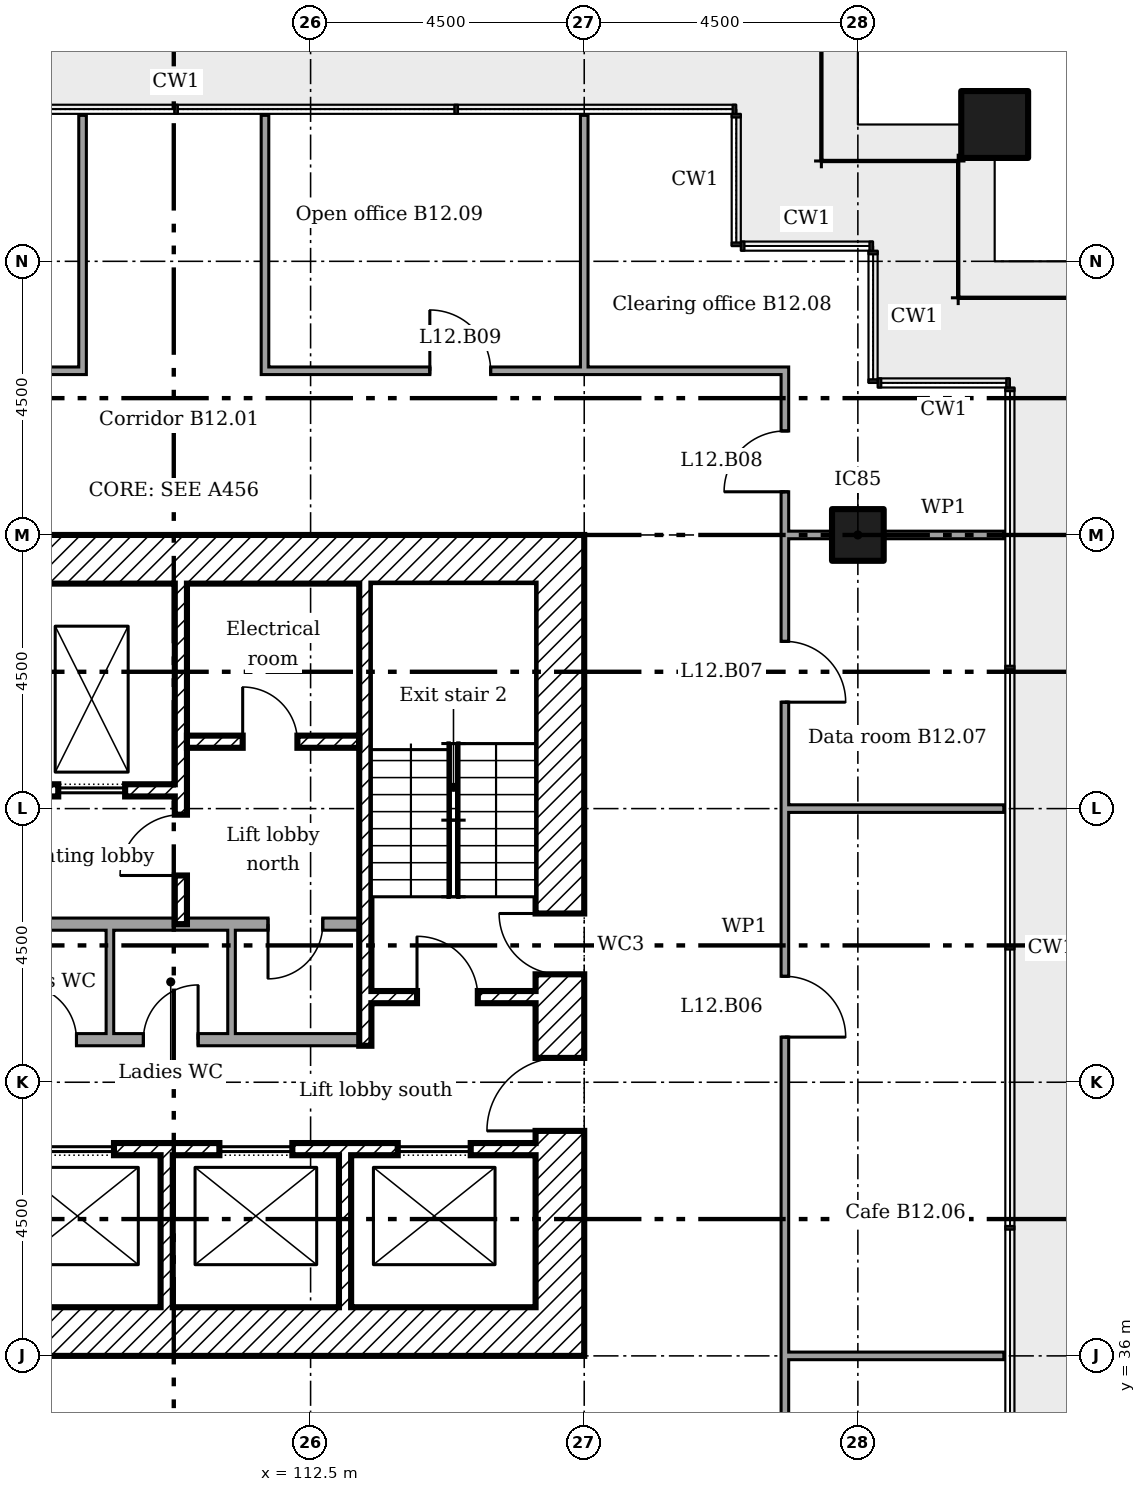
"""IFC4 building model, lengths in metres.
Left out: names, types, materials, properties, quantities, classifications, styles, units other than length and angle.
Written with IfcOpenShell. Run it as: python <this file> out.ifc"""

import sys

from ifc_helpers import new_model, si_unit, direction, frame, frame_2d, origin, origin_2d, place, context, subcontext, project, spatial, rectangle, extrude, element, fill, save


model = new_model("IFC4")
c1 = context("Model", 3, precision=1e-05, world=origin(), true_north=direction((0.0, 1.0)))
c2 = subcontext(c1, "Body", "Model", "MODEL_VIEW")
j1 = project(units=[si_unit("LENGTHUNIT", "METRE"), si_unit("PLANEANGLEUNIT", "RADIAN")], contexts=[c1])
p1 = place(None, origin())
s1 = spatial("IfcSite", under=j1, at=p1, CompositionType="ELEMENT")
p2 = place(p1, origin())
s2 = spatial("IfcBuilding", under=s1, at=p2, CompositionType="ELEMENT")
p3 = place(p2, frame((0.0, 0.0, 54.6)))
s3 = spatial("IfcBuildingStorey", under=s2, at=p3, CompositionType="ELEMENT", Elevation=54.6)
p4 = place(p3, frame((123.75, 56.25, 0.0)))
e1 = element("IfcColumn", 1, at=p4, inside=s3, PredefinedType="COLUMN", context=c2, shape_type="SweptSolid", body=[
    extrude(rectangle(XDim=1.1, YDim=1.1, at=origin_2d()), origin(), (0.0, 0.0, 1.0), 3.6),
])
p5 = place(p3, frame((121.5, 49.5, 0.0)))
e2 = element("IfcColumn", 2, at=p5, inside=s3, PredefinedType="COLUMN", context=c2, shape_type="SweptSolid", body=[
    extrude(rectangle(XDim=0.85, YDim=0.85, at=origin_2d()), origin(), (0.0, 0.0, 1.0), 3.6),
])
p6 = place(p3, frame((116.6, 36.0, 0.0), z_axis=(0.0, 0.0, 1.0), x_axis=(0.0, 1.0, 0.0)))
e3 = element("IfcWall", 3, at=p6, inside=s3, PredefinedType="SHEAR", context=c2, shape_type="SweptSolid", body=[
    extrude(rectangle(XDim=13.5, YDim=0.8, at=frame_2d((6.75, 0.0))), origin(), (0.0, 0.0, 1.0), 3.35),
])
p7 = place(p6, frame((3.7, 0.0, 0.0)))
e4 = element("IfcOpeningElement", 4, at=p7, cuts=e3, PredefinedType="OPENING", context=c2, shape_type="SweptSolid", body=[
    extrude(rectangle(XDim=1.2, YDim=2.1, at=frame_2d((0.6, 1.05))), frame((0.0, 0.41, 0.0), z_axis=(0.0, -1.0, 0.0), x_axis=(1.0, 0.0, 0.0)), (0.0, 0.0, 1.0), 0.82),
])
p8 = place(p6, frame((6.275, 0.0, 0.0)))
e5 = element("IfcOpeningElement", 5, at=p8, cuts=e3, PredefinedType="OPENING", context=c2, shape_type="SweptSolid", body=[
    extrude(rectangle(XDim=1.0, YDim=2.1, at=frame_2d((0.5, 1.05))), frame((0.0, 0.41, 0.0), z_axis=(0.0, -1.0, 0.0), x_axis=(1.0, 0.0, 0.0)), (0.0, 0.0, 1.0), 0.82),
])
for number, where in (
    (6, (104.3, 49.1, 0.0)),
    (7, (104.3, 36.4, 0.0)),
):
    element("IfcWall", number, at=place(p3, frame(where)), inside=s3, PredefinedType="SHEAR", context=c2, shape_type="SweptSolid", body=[
        extrude(rectangle(XDim=11.9, YDim=0.8, at=frame_2d((5.95, 0.0))), origin(), (0.0, 0.0, 1.0), 3.35),
    ])
p9 = place(p3, frame((110.367, 48.7, 0.0), z_axis=(0.0, 0.0, 1.0), x_axis=(0.0, -1.0, 0.0)))
e8 = element("IfcWall", 8, at=p9, inside=s3, PredefinedType="SHEAR", context=c2, shape_type="SweptSolid", body=[
    extrude(rectangle(XDim=5.6, YDim=0.2, at=frame_2d((2.8, 0.0))), origin(), (0.0, 0.0, 1.0), 3.35),
])
p10 = place(p9, frame((3.8, 0.0, 0.0)))
e9 = element("IfcOpeningElement", 9, at=p10, cuts=e8, PredefinedType="OPENING", context=c2, shape_type="SweptSolid", body=[
    extrude(rectangle(XDim=1.0, YDim=2.1, at=frame_2d((0.5, 1.05))), frame((0.0, 0.11, 0.0), z_axis=(0.0, -1.0, 0.0), x_axis=(1.0, 0.0, 0.0)), (0.0, 0.0, 1.0), 0.22),
])
for number, where, z_axis, x_axis in (
    (10, (110.133, 36.8, 0.0), (0.0, 0.0, 1.0), (0.0, 1.0, 0.0)),
    (11, (113.067, 36.8, 0.0), (0.0, 0.0, 1.0), (0.0, 1.0, 0.0)),
):
    element("IfcWall", number, at=place(p3, frame(where, z_axis=z_axis, x_axis=x_axis)), inside=s3, PredefinedType="SHEAR", context=c2, shape_type="SweptSolid", body=[
        extrude(rectangle(XDim=2.5, YDim=0.2, at=frame_2d((1.25, 0.0))), origin(), (0.0, 0.0, 1.0), 3.35),
    ])
p11 = place(p3, frame((110.467, 46.1, 0.0)))
e12 = element("IfcWall", 12, at=p11, inside=s3, PredefinedType="SHEAR", context=c2, shape_type="SweptSolid", body=[
    extrude(rectangle(XDim=2.833, YDim=0.2, at=frame_2d((1.417, 0.0))), origin(), (0.0, 0.0, 1.0), 3.35),
])
p12 = place(p11, frame((0.917, 0.0, 0.0)))
e13 = element("IfcOpeningElement", 13, at=p12, cuts=e12, PredefinedType="OPENING", context=c2, shape_type="SweptSolid", body=[
    extrude(rectangle(XDim=0.9, YDim=2.1, at=frame_2d((0.45, 1.05))), frame((0.0, 0.11, 0.0), z_axis=(0.0, -1.0, 0.0), x_axis=(1.0, 0.0, 0.0)), (0.0, 0.0, 1.0), 0.22),
])
p13 = place(p3, frame((107.533, 45.3, 0.0)))
e14 = element("IfcWall", 14, at=p13, inside=s3, PredefinedType="SHEAR", context=c2, shape_type="SweptSolid", body=[
    extrude(rectangle(XDim=2.733, YDim=0.2, at=frame_2d((1.367, 0.0))), origin(), (0.0, 0.0, 1.0), 3.35),
])
p14 = place(p13, frame((0.817, 0.0, 0.0)))
e15 = element("IfcOpeningElement", 15, at=p14, cuts=e14, PredefinedType="OPENING", context=c2, shape_type="SweptSolid", body=[
    extrude(rectangle(XDim=1.1, YDim=2.1, at=frame_2d((0.55, 1.05))), frame((0.0, 0.11, 0.0), z_axis=(0.0, -1.0, 0.0), x_axis=(1.0, 0.0, 0.0)), (0.0, 0.0, 1.0), 0.22),
])
p15 = place(p3, frame((107.2, 39.4, 0.0)))
e16 = element("IfcWall", 16, at=p15, inside=s3, PredefinedType="SHEAR", context=c2, shape_type="SweptSolid", body=[
    extrude(rectangle(XDim=9.0, YDim=0.2, at=frame_2d((4.5, 0.0))), origin(), (0.0, 0.0, 1.0), 3.35),
])
p16 = place(p15, frame((0.867, 0.0, 0.0)))
e17 = element("IfcOpeningElement", 17, at=p16, cuts=e16, PredefinedType="OPENING", context=c2, shape_type="SweptSolid", body=[
    extrude(rectangle(XDim=1.2, YDim=2.1, at=frame_2d((0.6, 1.05))), frame((0.0, 0.11, 0.0), z_axis=(0.0, -1.0, 0.0), x_axis=(1.0, 0.0, 0.0)), (0.0, 0.0, 1.0), 0.22),
])
p17 = place(p15, frame((3.8, 0.0, 0.0)))
e18 = element("IfcOpeningElement", 18, at=p17, cuts=e16, PredefinedType="OPENING", context=c2, shape_type="SweptSolid", body=[
    extrude(rectangle(XDim=1.2, YDim=2.1, at=frame_2d((0.6, 1.05))), frame((0.0, 0.11, 0.0), z_axis=(0.0, -1.0, 0.0), x_axis=(1.0, 0.0, 0.0)), (0.0, 0.0, 1.0), 0.22),
])
p18 = place(p15, frame((6.733, 0.0, 0.0)))
e19 = element("IfcOpeningElement", 19, at=p18, cuts=e16, PredefinedType="OPENING", context=c2, shape_type="SweptSolid", body=[
    extrude(rectangle(XDim=1.2, YDim=2.1, at=frame_2d((0.6, 1.05))), frame((0.0, 0.11, 0.0), z_axis=(0.0, -1.0, 0.0), x_axis=(1.0, 0.0, 0.0)), (0.0, 0.0, 1.0), 0.22),
])
p19 = place(p3, frame((113.5, 41.9, 0.0)))
e20 = element("IfcWall", 20, at=p19, inside=s3, PredefinedType="SHEAR", context=c2, shape_type="SweptSolid", body=[
    extrude(rectangle(XDim=2.7, YDim=0.2, at=frame_2d((1.35, 0.0))), origin(), (0.0, 0.0, 1.0), 3.35),
])
p20 = place(p19, frame((0.75, 0.0, 0.0)))
e21 = element("IfcOpeningElement", 21, at=p20, cuts=e20, PredefinedType="OPENING", context=c2, shape_type="SweptSolid", body=[
    extrude(rectangle(XDim=1.0, YDim=2.1, at=frame_2d((0.5, 1.05))), frame((0.0, 0.11, 0.0), z_axis=(0.0, -1.0, 0.0), x_axis=(1.0, 0.0, 0.0)), (0.0, 0.0, 1.0), 0.22),
])
p21 = place(p3, frame((113.4, 41.1, 0.0), z_axis=(0.0, 0.0, 1.0), x_axis=(0.0, 1.0, 0.0)))
e22 = element("IfcWall", 22, at=p21, inside=s3, PredefinedType="SHEAR", context=c2, shape_type="SweptSolid", body=[
    extrude(rectangle(XDim=7.6, YDim=0.2, at=frame_2d((3.8, 0.0))), origin(), (0.0, 0.0, 1.0), 3.35),
])
p22 = place(p3, frame((107.2, 43.1, 0.0)))
e23 = element("IfcWall", 23, at=p22, inside=s3, PredefinedType="PARTITIONING", context=c2, shape_type="SweptSolid", body=[
    extrude(rectangle(XDim=6.1, YDim=0.2, at=frame_2d((3.05, 0.0))), origin(), (0.0, 0.0, 1.0), 3.35),
])
p23 = place(p22, frame((4.6, 0.0, 0.0)))
e24 = element("IfcOpeningElement", 24, at=p23, cuts=e23, PredefinedType="OPENING", context=c2, shape_type="SweptSolid", body=[
    extrude(rectangle(XDim=0.9, YDim=2.1, at=frame_2d((0.45, 1.05))), frame((0.0, 0.11, 0.0), z_axis=(0.0, -1.0, 0.0), x_axis=(1.0, 0.0, 0.0)), (0.0, 0.0, 1.0), 0.22),
])
p24 = place(p3, frame((107.2, 41.2, 0.0)))
e25 = element("IfcWall", 25, at=p24, inside=s3, PredefinedType="PARTITIONING", context=c2, shape_type="SweptSolid", body=[
    extrude(rectangle(XDim=6.1, YDim=0.2, at=frame_2d((3.05, 0.0))), origin(), (0.0, 0.0, 1.0), 3.35),
])
p25 = place(p24, frame((0.55, 0.0, 0.0)))
e26 = element("IfcOpeningElement", 26, at=p25, cuts=e25, PredefinedType="OPENING", context=c2, shape_type="SweptSolid", body=[
    extrude(rectangle(XDim=0.9, YDim=2.1, at=frame_2d((0.45, 1.05))), frame((0.0, 0.11, 0.0), z_axis=(0.0, -1.0, 0.0), x_axis=(1.0, 0.0, 0.0)), (0.0, 0.0, 1.0), 0.22),
])
p26 = place(p24, frame((2.55, 0.0, 0.0)))
e27 = element("IfcOpeningElement", 27, at=p26, cuts=e25, PredefinedType="OPENING", context=c2, shape_type="SweptSolid", body=[
    extrude(rectangle(XDim=0.9, YDim=2.1, at=frame_2d((0.45, 1.05))), frame((0.0, 0.11, 0.0), z_axis=(0.0, -1.0, 0.0), x_axis=(1.0, 0.0, 0.0)), (0.0, 0.0, 1.0), 0.22),
])
for number, where, z_axis, x_axis in (
    (28, (109.2, 41.3, 0.0), (0.0, 0.0, 1.0), (0.0, 1.0, 0.0)),
    (29, (111.2, 41.3, 0.0), (0.0, 0.0, 1.0), (0.0, 1.0, 0.0)),
):
    element("IfcWall", number, at=place(p3, frame(where, z_axis=z_axis, x_axis=x_axis)), inside=s3, PredefinedType="PARTITIONING", context=c2, shape_type="SweptSolid", body=[
        extrude(rectangle(XDim=1.7, YDim=0.125, at=frame_2d((0.85, 0.0))), origin(), (0.0, 0.0, 1.0), 3.35),
    ])
for number, where in (
    (30, (120.3, 36.0, 0.0)),
    (31, (120.3, 45.0, 0.0)),
):
    element("IfcWall", number, at=place(p3, frame(where)), inside=s3, PredefinedType="PARTITIONING", context=c2, shape_type="SweptSolid", body=[
        extrude(rectangle(XDim=3.6, YDim=0.125, at=frame_2d((1.8, 0.0))), origin(), (0.0, 0.0, 1.0), 2.851),
    ])
p27 = place(p3, frame((120.3, 49.5, 0.0)))
e32 = element("IfcWall", 32, at=p27, inside=s3, PredefinedType="PARTITIONING", context=c2, shape_type="SweptSolid", body=[
    extrude(rectangle(XDim=0.775, YDim=0.125, at=frame_2d((0.387, 0.0))), origin(), (0.0, 0.0, 1.0), 2.842),
])
p28 = place(p3, frame((121.925, 49.5, 0.0)))
e33 = element("IfcWall", 33, at=p28, inside=s3, PredefinedType="PARTITIONING", context=c2, shape_type="SweptSolid", body=[
    extrude(rectangle(XDim=1.975, YDim=0.125, at=frame_2d((0.987, 0.0))), origin(), (0.0, 0.0, 1.0), 2.842),
])
p29 = place(p3, frame((100.738, 52.2, 0.0)))
e34 = element("IfcWall", 34, at=p29, inside=s3, PredefinedType="PARTITIONING", context=c2, shape_type="SweptSolid", body=[
    extrude(rectangle(XDim=8.075, YDim=0.125, at=frame_2d((4.038, 0.0))), origin(), (0.0, 0.0, 1.0), 3.45),
])
p30 = place(p29, frame((4.887, 0.0, 0.0)))
e35 = element("IfcOpeningElement", 35, at=p30, cuts=e34, PredefinedType="OPENING", context=c2, shape_type="SweptSolid", body=[
    extrude(rectangle(XDim=1.0, YDim=2.1, at=frame_2d((0.5, 1.05))), frame((0.0, 0.073, 0.0), z_axis=(0.0, -1.0, 0.0), x_axis=(1.0, 0.0, 0.0)), (0.0, 0.0, 1.0), 0.145),
])
p31 = place(p3, frame((111.688, 52.2, 0.0)))
e36 = element("IfcWall", 36, at=p31, inside=s3, PredefinedType="PARTITIONING", context=c2, shape_type="SweptSolid", body=[
    extrude(rectangle(XDim=8.675, YDim=0.125, at=frame_2d((4.337, 0.0))), origin(), (0.0, 0.0, 1.0), 3.45),
])
p32 = place(p31, frame((2.773, 0.0, 0.0)))
e37 = element("IfcOpeningElement", 37, at=p32, cuts=e36, PredefinedType="OPENING", context=c2, shape_type="SweptSolid", body=[
    extrude(rectangle(XDim=1.0, YDim=2.1, at=frame_2d((0.5, 1.05))), frame((0.0, 0.073, 0.0), z_axis=(0.0, -1.0, 0.0), x_axis=(1.0, 0.0, 0.0)), (0.0, 0.0, 1.0), 0.145),
])
for number, where, z_axis, x_axis in (
    (38, (108.75, 52.262, 0.0), (0.0, 0.0, 1.0), (0.0, 1.0, 0.0)),
    (39, (111.75, 52.262, 0.0), (0.0, 0.0, 1.0), (0.0, 1.0, 0.0)),
):
    element("IfcWall", number, at=place(p3, frame(where, z_axis=z_axis, x_axis=x_axis)), inside=s3, PredefinedType="PARTITIONING", context=c2, shape_type="SweptSolid", body=[
        extrude(rectangle(XDim=4.137, YDim=0.125, at=frame_2d((2.069, 0.0))), origin(), (0.0, 0.0, 1.0), 3.45),
    ])
p33 = place(p3, frame((117.0, 52.2, 0.0), z_axis=(0.0, 0.0, 1.0), x_axis=(0.0, 1.0, 0.0)))
e40 = element("IfcWall", 40, at=p33, inside=s3, PredefinedType="PARTITIONING", context=c2, shape_type="SweptSolid", body=[
    extrude(rectangle(XDim=4.2, YDim=0.125, at=frame_2d((2.1, 0.0))), origin(), (0.0, 0.0, 1.0), 2.851),
])
p34 = place(p3, frame((120.3, 33.962, 0.0), z_axis=(0.0, 0.0, 1.0), x_axis=(0.0, 1.0, 0.0)))
e41 = element("IfcWall", 41, at=p34, inside=s3, PredefinedType="PARTITIONING", context=c2, shape_type="SweptSolid", body=[
    extrude(rectangle(XDim=18.175, YDim=0.125, at=frame_2d((9.087, 0.0))), origin(), (0.0, 0.0, 1.0), 3.45),
])
p35 = place(p34, frame((7.28, 0.0, 0.0)))
e42 = element("IfcOpeningElement", 42, at=p35, cuts=e41, PredefinedType="OPENING", context=c2, shape_type="SweptSolid", body=[
    extrude(rectangle(XDim=1.0, YDim=2.1, at=frame_2d((0.5, 1.05))), frame((0.0, 0.073, 0.0), z_axis=(0.0, -1.0, 0.0), x_axis=(1.0, 0.0, 0.0)), (0.0, 0.0, 1.0), 0.145),
])
p36 = place(p34, frame((12.788, 0.0, 0.0)))
e43 = element("IfcOpeningElement", 43, at=p36, cuts=e41, PredefinedType="OPENING", context=c2, shape_type="SweptSolid", body=[
    extrude(rectangle(XDim=1.0, YDim=2.1, at=frame_2d((0.5, 1.05))), frame((0.0, 0.073, 0.0), z_axis=(0.0, -1.0, 0.0), x_axis=(1.0, 0.0, 0.0)), (0.0, 0.0, 1.0), 0.145),
])
p37 = place(p34, frame((16.248, 0.0, 0.0)))
e44 = element("IfcOpeningElement", 44, at=p37, cuts=e41, PredefinedType="OPENING", context=c2, shape_type="SweptSolid", body=[
    extrude(rectangle(XDim=1.0, YDim=2.1, at=frame_2d((0.5, 1.05))), frame((0.0, 0.073, 0.0), z_axis=(0.0, -1.0, 0.0), x_axis=(1.0, 0.0, 0.0)), (0.0, 0.0, 1.0), 0.145),
])
p38 = place(p7, origin())
e45 = element("IfcDoor", 45, at=p38, inside=s3, OperationType="SINGLE_SWING_RIGHT", PredefinedType="DOOR", context=c2, shape_type="SweptSolid", body=[
    extrude(rectangle(XDim=1.2, YDim=2.1, at=frame_2d((0.6, 1.05))), frame((0.0, 0.025, 0.0), z_axis=(0.0, -1.0, 0.0), x_axis=(1.0, 0.0, 0.0)), (0.0, 0.0, 1.0), 0.05),
])
fill(e4, e45)
p39 = place(p20, origin())
e46 = element("IfcDoor", 46, at=p39, inside=s3, OperationType="SINGLE_SWING_RIGHT", PredefinedType="DOOR", context=c2, shape_type="SweptSolid", body=[
    extrude(rectangle(XDim=1.0, YDim=2.1, at=frame_2d((0.5, 1.05))), frame((0.0, 0.025, 0.0), z_axis=(0.0, -1.0, 0.0), x_axis=(1.0, 0.0, 0.0)), (0.0, 0.0, 1.0), 0.05),
])
fill(e21, e46)
p40 = place(p8, origin())
e47 = element("IfcDoor", 47, at=p40, inside=s3, OperationType="SINGLE_SWING_LEFT", PredefinedType="DOOR", context=c2, shape_type="SweptSolid", body=[
    extrude(rectangle(XDim=1.0, YDim=2.1, at=frame_2d((0.5, 1.05))), frame((0.0, 0.025, 0.0), z_axis=(0.0, -1.0, 0.0), x_axis=(1.0, 0.0, 0.0)), (0.0, 0.0, 1.0), 0.05),
])
fill(e5, e47)
p41 = place(p10, frame((1.0, 0.0, 0.0), x_axis=(-1.0, 0.0, 0.0)))
e48 = element("IfcDoor", 48, at=p41, inside=s3, OperationType="SINGLE_SWING_RIGHT", PredefinedType="DOOR", context=c2, shape_type="SweptSolid", body=[
    extrude(rectangle(XDim=1.0, YDim=2.1, at=frame_2d((0.5, 1.05))), frame((0.0, 0.025, 0.0), z_axis=(0.0, -1.0, 0.0), x_axis=(1.0, 0.0, 0.0)), (0.0, 0.0, 1.0), 0.05),
])
fill(e9, e48)
p42 = place(p12, origin())
e49 = element("IfcDoor", 49, at=p42, inside=s3, OperationType="SINGLE_SWING_RIGHT", PredefinedType="DOOR", context=c2, shape_type="SweptSolid", body=[
    extrude(rectangle(XDim=0.9, YDim=2.1, at=frame_2d((0.45, 1.05))), frame((0.0, 0.025, 0.0), z_axis=(0.0, -1.0, 0.0), x_axis=(1.0, 0.0, 0.0)), (0.0, 0.0, 1.0), 0.05),
])
fill(e13, e49)
p43 = place(p25, origin())
e50 = element("IfcDoor", 50, at=p43, inside=s3, OperationType="SINGLE_SWING_RIGHT", PredefinedType="DOOR", context=c2, shape_type="SweptSolid", body=[
    extrude(rectangle(XDim=0.9, YDim=2.1, at=frame_2d((0.45, 1.05))), frame((0.0, 0.025, 0.0), z_axis=(0.0, -1.0, 0.0), x_axis=(1.0, 0.0, 0.0)), (0.0, 0.0, 1.0), 0.05),
])
fill(e26, e50)
p44 = place(p26, origin())
e51 = element("IfcDoor", 51, at=p44, inside=s3, OperationType="SINGLE_SWING_LEFT", PredefinedType="DOOR", context=c2, shape_type="SweptSolid", body=[
    extrude(rectangle(XDim=0.9, YDim=2.1, at=frame_2d((0.45, 1.05))), frame((0.0, 0.025, 0.0), z_axis=(0.0, -1.0, 0.0), x_axis=(1.0, 0.0, 0.0)), (0.0, 0.0, 1.0), 0.05),
])
fill(e27, e51)
p45 = place(p23, frame((0.9, 0.0, 0.0), x_axis=(-1.0, 0.0, 0.0)))
e52 = element("IfcDoor", 52, at=p45, inside=s3, OperationType="SINGLE_SWING_LEFT", PredefinedType="DOOR", context=c2, shape_type="SweptSolid", body=[
    extrude(rectangle(XDim=0.9, YDim=2.1, at=frame_2d((0.45, 1.05))), frame((0.0, 0.025, 0.0), z_axis=(0.0, -1.0, 0.0), x_axis=(1.0, 0.0, 0.0)), (0.0, 0.0, 1.0), 0.05),
])
fill(e24, e52)
p46 = place(p14, origin())
e53 = element("IfcDoor", 53, at=p46, inside=s3, OperationType="SLIDING_TO_LEFT", PredefinedType="DOOR", context=c2, shape_type="SweptSolid", body=[
    extrude(rectangle(XDim=1.1, YDim=2.1, at=frame_2d((0.55, 1.05))), frame((0.0, 0.025, 0.0), z_axis=(0.0, -1.0, 0.0), x_axis=(1.0, 0.0, 0.0)), (0.0, 0.0, 1.0), 0.05),
])
fill(e15, e53)
p47 = place(p16, origin())
e54 = element("IfcDoor", 54, at=p47, inside=s3, OperationType="SLIDING_TO_LEFT", PredefinedType="DOOR", context=c2, shape_type="SweptSolid", body=[
    extrude(rectangle(XDim=1.2, YDim=2.1, at=frame_2d((0.6, 1.05))), frame((0.0, 0.025, 0.0), z_axis=(0.0, -1.0, 0.0), x_axis=(1.0, 0.0, 0.0)), (0.0, 0.0, 1.0), 0.05),
])
fill(e17, e54)
p48 = place(p17, origin())
e55 = element("IfcDoor", 55, at=p48, inside=s3, OperationType="SLIDING_TO_LEFT", PredefinedType="DOOR", context=c2, shape_type="SweptSolid", body=[
    extrude(rectangle(XDim=1.2, YDim=2.1, at=frame_2d((0.6, 1.05))), frame((0.0, 0.025, 0.0), z_axis=(0.0, -1.0, 0.0), x_axis=(1.0, 0.0, 0.0)), (0.0, 0.0, 1.0), 0.05),
])
fill(e18, e55)
p49 = place(p18, origin())
e56 = element("IfcDoor", 56, at=p49, inside=s3, OperationType="SLIDING_TO_LEFT", PredefinedType="DOOR", context=c2, shape_type="SweptSolid", body=[
    extrude(rectangle(XDim=1.2, YDim=2.1, at=frame_2d((0.6, 1.05))), frame((0.0, 0.025, 0.0), z_axis=(0.0, -1.0, 0.0), x_axis=(1.0, 0.0, 0.0)), (0.0, 0.0, 1.0), 0.05),
])
fill(e19, e56)
p50 = place(p35, frame((1.0, 0.0, 0.0), x_axis=(-1.0, 0.0, 0.0)))
e57 = element("IfcDoor", 57, at=p50, inside=s3, OperationType="SINGLE_SWING_LEFT", PredefinedType="DOOR", context=c2, shape_type="SweptSolid", body=[
    extrude(rectangle(XDim=1.0, YDim=2.1, at=frame_2d((0.5, 1.05))), frame((0.0, 0.025, 0.0), z_axis=(0.0, -1.0, 0.0), x_axis=(1.0, 0.0, 0.0)), (0.0, 0.0, 1.0), 0.05),
])
fill(e42, e57)
p51 = place(p36, frame((1.0, 0.0, 0.0), x_axis=(-1.0, 0.0, 0.0)))
e58 = element("IfcDoor", 58, at=p51, inside=s3, OperationType="SINGLE_SWING_LEFT", PredefinedType="DOOR", context=c2, shape_type="SweptSolid", body=[
    extrude(rectangle(XDim=1.0, YDim=2.1, at=frame_2d((0.5, 1.05))), frame((0.0, 0.025, 0.0), z_axis=(0.0, -1.0, 0.0), x_axis=(1.0, 0.0, 0.0)), (0.0, 0.0, 1.0), 0.05),
])
fill(e43, e58)
p52 = place(p37, origin())
e59 = element("IfcDoor", 59, at=p52, inside=s3, OperationType="SINGLE_SWING_RIGHT", PredefinedType="DOOR", context=c2, shape_type="SweptSolid", body=[
    extrude(rectangle(XDim=1.0, YDim=2.1, at=frame_2d((0.5, 1.05))), frame((0.0, 0.025, 0.0), z_axis=(0.0, -1.0, 0.0), x_axis=(1.0, 0.0, 0.0)), (0.0, 0.0, 1.0), 0.05),
])
fill(e44, e59)
p53 = place(p32, origin())
e60 = element("IfcDoor", 60, at=p53, inside=s3, OperationType="SINGLE_SWING_RIGHT", PredefinedType="DOOR", context=c2, shape_type="SweptSolid", body=[
    extrude(rectangle(XDim=1.0, YDim=2.1, at=frame_2d((0.5, 1.05))), frame((0.0, 0.025, 0.0), z_axis=(0.0, -1.0, 0.0), x_axis=(1.0, 0.0, 0.0)), (0.0, 0.0, 1.0), 0.05),
])
fill(e37, e60)
save(model, sys.argv[1])
